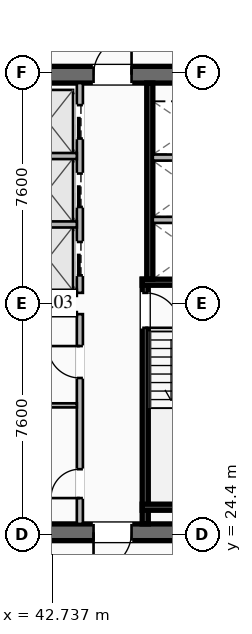
"""IFC4 building model, lengths in metres.
Left out: names, types, materials, properties, quantities, classifications, styles, units other than length and angle.
Written with IfcOpenShell. Run it as: python <this file> out.ifc"""

import sys

from ifc_helpers import new_model, si_unit, direction, frame, frame_2d, origin, place, context, subcontext, project, spatial, rectangle, extrude, element, fill, save


model = new_model("IFC4")
c1 = context("Model", 3, precision=1e-05, world=origin(), true_north=direction((0.0, 1.0)))
c2 = subcontext(c1, "Body", "Model", "MODEL_VIEW")
j1 = project(units=[si_unit("LENGTHUNIT", "METRE"), si_unit("PLANEANGLEUNIT", "RADIAN")], contexts=[c1])
p1 = place(None, origin())
s1 = spatial("IfcSite", under=j1, at=p1, CompositionType="ELEMENT")
p2 = place(p1, origin())
s2 = spatial("IfcBuilding", under=s1, at=p2, CompositionType="ELEMENT")
p3 = place(p2, frame((0.0, 0.0, 185.4)))
s3 = spatial("IfcBuildingStorey", under=s2, at=p3, CompositionType="ELEMENT", Elevation=185.4)
p4 = place(p3, frame((49.25, 24.475, 0.0), z_axis=(0.0, 0.0, 1.0), x_axis=(-1.0, 0.0, 0.0)))
e1 = element("IfcWall", 1, at=p4, inside=s3, PredefinedType="SHEAR", context=c2, shape_type="SweptSolid", body=[
    extrude(rectangle(XDim=14.5, YDim=0.55, at=frame_2d((7.25, 0.0))), origin(), (0.0, 0.0, 1.0), 3.55),
])
p5 = place(p4, frame((8.95, 0.0, 0.0)))
e2 = element("IfcOpeningElement", 2, at=p5, cuts=e1, PredefinedType="OPENING", context=c2, shape_type="SweptSolid", body=[
    extrude(rectangle(XDim=1.25, YDim=2.25, at=frame_2d((0.625, 1.125))), frame((0.0, 0.285, 0.0), z_axis=(0.0, -1.0, 0.0), x_axis=(1.0, 0.0, 0.0)), (0.0, 0.0, 1.0), 0.57),
])
p6 = place(p4, frame((3.9, 0.0, 0.0)))
e3 = element("IfcOpeningElement", 3, at=p6, cuts=e1, PredefinedType="OPENING", context=c2, shape_type="SweptSolid", body=[
    extrude(rectangle(XDim=1.25, YDim=2.25, at=frame_2d((0.625, 1.125))), frame((0.0, 0.285, 0.0), z_axis=(0.0, -1.0, 0.0), x_axis=(1.0, 0.0, 0.0)), (0.0, 0.0, 1.0), 0.57),
])
p7 = place(p3, frame((34.75, 39.525, 0.0), z_axis=(0.0, 0.0, 1.0), x_axis=(1.0, 0.0, 0.0)))
e4 = element("IfcWall", 4, at=p7, inside=s3, PredefinedType="SHEAR", context=c2, shape_type="SweptSolid", body=[
    extrude(rectangle(XDim=14.5, YDim=0.55, at=frame_2d((7.25, 0.0))), origin(), (0.0, 0.0, 1.0), 3.55),
])
p8 = place(p7, frame((4.3, 0.0, 0.0)))
e5 = element("IfcOpeningElement", 5, at=p8, cuts=e4, PredefinedType="OPENING", context=c2, shape_type="SweptSolid", body=[
    extrude(rectangle(XDim=1.25, YDim=2.25, at=frame_2d((0.625, 1.125))), frame((0.0, 0.285, 0.0), z_axis=(0.0, -1.0, 0.0), x_axis=(1.0, 0.0, 0.0)), (0.0, 0.0, 1.0), 0.57),
])
p9 = place(p7, frame((9.35, 0.0, 0.0)))
e6 = element("IfcOpeningElement", 6, at=p9, cuts=e4, PredefinedType="OPENING", context=c2, shape_type="SweptSolid", body=[
    extrude(rectangle(XDim=1.25, YDim=2.25, at=frame_2d((0.625, 1.125))), frame((0.0, 0.285, 0.0), z_axis=(0.0, -1.0, 0.0), x_axis=(1.0, 0.0, 0.0)), (0.0, 0.0, 1.0), 0.57),
])
p10 = place(p3, frame((45.8, 32.8, 0.0), z_axis=(0.0, 0.0, 1.0), x_axis=(0.0, -1.0, 0.0)))
e7 = element("IfcWall", 7, at=p10, inside=s3, PredefinedType="SHEAR", context=c2, shape_type="SweptSolid", body=[
    extrude(rectangle(XDim=8.05, YDim=0.2, at=frame_2d((4.025, 0.0))), origin(), (0.0, 0.0, 1.0), 3.37),
])
p11 = place(p10, frame((0.45, 0.0, 0.0)))
e8 = element("IfcOpeningElement", 8, at=p11, cuts=e7, PredefinedType="OPENING", context=c2, shape_type="SweptSolid", body=[
    extrude(rectangle(XDim=1.15, YDim=2.2, at=frame_2d((0.575, 1.1))), frame((0.0, 0.11, 0.0), z_axis=(0.0, -1.0, 0.0), x_axis=(1.0, 0.0, 0.0)), (0.0, 0.0, 1.0), 0.22),
])
for number, where, z_axis, x_axis in (
    (9, (45.7, 32.7, 0.0), (0.0, 0.0, 1.0), (1.0, 0.0, 0.0)),
    (10, (45.7, 25.3, 0.0), (0.0, 0.0, 1.0), (1.0, 0.0, 0.0)),
):
    element("IfcWall", number, at=place(p3, frame(where, z_axis=z_axis, x_axis=x_axis)), inside=s3, PredefinedType="SHEAR", context=c2, shape_type="SweptSolid", body=[
        extrude(rectangle(XDim=3.55, YDim=0.2, at=frame_2d((1.775, 0.0))), origin(), (0.0, 0.0, 1.0), 3.37),
    ])
p12 = place(p3, frame((45.95, 39.25, 0.0), z_axis=(0.0, 0.0, 1.0), x_axis=(0.0, -1.0, 0.0)))
e11 = element("IfcWall", 11, at=p12, inside=s3, PredefinedType="SHEAR", context=c2, shape_type="SweptSolid", body=[
    extrude(rectangle(XDim=6.45, YDim=0.2, at=frame_2d((3.225, 0.0))), origin(), (0.0, 0.0, 1.0), 3.37),
])
for number, where, z_axis, x_axis in (
    (12, (46.05, 34.75, 0.0), (0.0, 0.0, 1.0), (1.0, 0.0, 0.0)),
    (13, (46.05, 36.8, 0.0), (0.0, 0.0, 1.0), (1.0, 0.0, 0.0)),
):
    element("IfcWall", number, at=place(p3, frame(where, z_axis=z_axis, x_axis=x_axis)), inside=s3, PredefinedType="SOLIDWALL", context=c2, shape_type="SweptSolid", body=[
        extrude(rectangle(XDim=3.2, YDim=0.2, at=frame_2d((1.6, 0.0))), origin(), (0.0, 0.0, 1.0), 3.37),
    ])
p13 = place(p3, frame((43.65, 24.75, 0.0), z_axis=(0.0, 0.0, 1.0), x_axis=(0.0, 1.0, 0.0)))
e14 = element("IfcWall", 14, at=p13, inside=s3, PredefinedType="SOLIDWALL", context=c2, shape_type="SweptSolid", body=[
    extrude(rectangle(XDim=6.9, YDim=0.2, at=frame_2d((3.45, 0.0))), origin(), (0.0, 0.0, 1.0), 2.723),
])
p14 = place(p13, frame((0.85, 0.0, 0.0)))
e15 = element("IfcOpeningElement", 15, at=p14, cuts=e14, PredefinedType="OPENING", context=c2, shape_type="SweptSolid", body=[
    extrude(rectangle(XDim=0.95, YDim=2.05, at=frame_2d((0.475, 1.025))), frame((0.0, 0.11, 0.0), z_axis=(0.0, -1.0, 0.0), x_axis=(1.0, 0.0, 0.0)), (0.0, 0.0, 1.0), 0.22),
])
p15 = place(p13, frame((4.8, 0.0, 0.0)))
e16 = element("IfcOpeningElement", 16, at=p15, cuts=e14, PredefinedType="OPENING", context=c2, shape_type="SweptSolid", body=[
    extrude(rectangle(XDim=1.05, YDim=2.2, at=frame_2d((0.525, 1.1))), frame((0.0, 0.11, 0.0), z_axis=(0.0, -1.0, 0.0), x_axis=(1.0, 0.0, 0.0)), (0.0, 0.0, 1.0), 0.22),
])
for number, where, z_axis, x_axis in (
    (17, (41.67, 31.65, 0.0), (0.0, 0.0, 1.0), (1.0, 0.0, 0.0)),
    (18, (41.67, 28.65, 0.0), (0.0, 0.0, 1.0), (1.0, 0.0, 0.0)),
):
    element("IfcWall", number, at=place(p3, frame(where, z_axis=z_axis, x_axis=x_axis)), inside=s3, PredefinedType="PARTITIONING", context=c2, shape_type="SweptSolid", body=[
        extrude(rectangle(XDim=1.88, YDim=0.135, at=frame_2d((0.94, 0.0))), origin(), (0.0, 0.0, 1.0), 2.723),
    ])
p16 = place(p3, frame((43.65, 32.35, 0.0), z_axis=(0.0, 0.0, 1.0), x_axis=(0.0, 1.0, 0.0)))
e19 = element("IfcWall", 19, at=p16, inside=s3, PredefinedType="SOLIDWALL", context=c2, shape_type="SweptSolid", body=[
    extrude(rectangle(XDim=6.9, YDim=0.2, at=frame_2d((3.45, 0.0))), origin(), (0.0, 0.0, 1.0), 3.37),
])
p17 = place(p16, frame((0.575, 0.0, 0.0)))
e20 = element("IfcOpeningElement", 20, at=p17, cuts=e19, PredefinedType="OPENING", context=c2, shape_type="SweptSolid", body=[
    extrude(rectangle(XDim=1.1, YDim=2.2, at=frame_2d((0.55, 1.1))), frame((0.0, 0.11, 0.0), z_axis=(0.0, -1.0, 0.0), x_axis=(1.0, 0.0, 0.0)), (0.0, 0.0, 1.0), 0.22),
])
p18 = place(p16, frame((2.825, 0.0, 0.0)))
e21 = element("IfcOpeningElement", 21, at=p18, cuts=e19, PredefinedType="OPENING", context=c2, shape_type="SweptSolid", body=[
    extrude(rectangle(XDim=1.1, YDim=2.2, at=frame_2d((0.55, 1.1))), frame((0.0, 0.11, 0.0), z_axis=(0.0, -1.0, 0.0), x_axis=(1.0, 0.0, 0.0)), (0.0, 0.0, 1.0), 0.22),
])
p19 = place(p16, frame((5.075, 0.0, 0.0)))
e22 = element("IfcOpeningElement", 22, at=p19, cuts=e19, PredefinedType="OPENING", context=c2, shape_type="SweptSolid", body=[
    extrude(rectangle(XDim=1.1, YDim=2.2, at=frame_2d((0.55, 1.1))), frame((0.0, 0.11, 0.0), z_axis=(0.0, -1.0, 0.0), x_axis=(1.0, 0.0, 0.0)), (0.0, 0.0, 1.0), 0.22),
])
for number, where, z_axis, x_axis in (
    (23, (41.67, 32.35, 0.0), (0.0, 0.0, 1.0), (1.0, 0.0, 0.0)),
    (24, (41.67, 34.6, 0.0), (0.0, 0.0, 1.0), (1.0, 0.0, 0.0)),
    (25, (41.67, 36.85, 0.0), (0.0, 0.0, 1.0), (1.0, 0.0, 0.0)),
):
    element("IfcWall", number, at=place(p3, frame(where, z_axis=z_axis, x_axis=x_axis)), inside=s3, PredefinedType="SOLIDWALL", context=c2, shape_type="SweptSolid", body=[
        extrude(rectangle(XDim=1.88, YDim=0.2, at=frame_2d((0.94, 0.0))), origin(), (0.0, 0.0, 1.0), 3.37),
    ])
p20 = place(p9, origin())
e26 = element("IfcDoor", 26, at=p20, inside=s3, OperationType="SINGLE_SWING_RIGHT", PredefinedType="DOOR", context=c2, shape_type="SweptSolid", body=[
    extrude(rectangle(XDim=1.25, YDim=2.25, at=frame_2d((0.625, 1.125))), frame((0.0, 0.025, 0.0), z_axis=(0.0, -1.0, 0.0), x_axis=(1.0, 0.0, 0.0)), (0.0, 0.0, 1.0), 0.05),
])
fill(e6, e26)
p21 = place(p6, origin())
e27 = element("IfcDoor", 27, at=p21, inside=s3, OperationType="SINGLE_SWING_RIGHT", PredefinedType="DOOR", context=c2, shape_type="SweptSolid", body=[
    extrude(rectangle(XDim=1.25, YDim=2.25, at=frame_2d((0.625, 1.125))), frame((0.0, 0.025, 0.0), z_axis=(0.0, -1.0, 0.0), x_axis=(1.0, 0.0, 0.0)), (0.0, 0.0, 1.0), 0.05),
])
fill(e3, e27)
p22 = place(p11, origin())
e28 = element("IfcDoor", 28, at=p22, inside=s3, OperationType="SINGLE_SWING_RIGHT", PredefinedType="DOOR", context=c2, shape_type="SweptSolid", body=[
    extrude(rectangle(XDim=1.15, YDim=2.2, at=frame_2d((0.575, 1.1))), frame((0.0, 0.025, 0.0), z_axis=(0.0, -1.0, 0.0), x_axis=(1.0, 0.0, 0.0)), (0.0, 0.0, 1.0), 0.05),
])
fill(e8, e28)
p23 = place(p14, origin())
e29 = element("IfcDoor", 29, at=p23, inside=s3, OperationType="SINGLE_SWING_LEFT", PredefinedType="DOOR", context=c2, shape_type="SweptSolid", body=[
    extrude(rectangle(XDim=0.95, YDim=2.05, at=frame_2d((0.475, 1.025))), frame((0.0, 0.025, 0.0), z_axis=(0.0, -1.0, 0.0), x_axis=(1.0, 0.0, 0.0)), (0.0, 0.0, 1.0), 0.05),
])
fill(e15, e29)
p24 = place(p15, origin())
e30 = element("IfcDoor", 30, at=p24, inside=s3, OperationType="SINGLE_SWING_RIGHT", PredefinedType="DOOR", context=c2, shape_type="SweptSolid", body=[
    extrude(rectangle(XDim=1.05, YDim=2.2, at=frame_2d((0.525, 1.1))), frame((0.0, 0.025, 0.0), z_axis=(0.0, -1.0, 0.0), x_axis=(1.0, 0.0, 0.0)), (0.0, 0.0, 1.0), 0.05),
])
fill(e16, e30)
p25 = place(p17, origin())
e31 = element("IfcDoor", 31, at=p25, inside=s3, OperationType="SLIDING_TO_LEFT", PredefinedType="DOOR", context=c2, shape_type="SweptSolid", body=[
    extrude(rectangle(XDim=1.1, YDim=2.2, at=frame_2d((0.55, 1.1))), frame((0.0, 0.025, 0.0), z_axis=(0.0, -1.0, 0.0), x_axis=(1.0, 0.0, 0.0)), (0.0, 0.0, 1.0), 0.05),
])
fill(e20, e31)
p26 = place(p18, origin())
e32 = element("IfcDoor", 32, at=p26, inside=s3, OperationType="SLIDING_TO_LEFT", PredefinedType="DOOR", context=c2, shape_type="SweptSolid", body=[
    extrude(rectangle(XDim=1.1, YDim=2.2, at=frame_2d((0.55, 1.1))), frame((0.0, 0.025, 0.0), z_axis=(0.0, -1.0, 0.0), x_axis=(1.0, 0.0, 0.0)), (0.0, 0.0, 1.0), 0.05),
])
fill(e21, e32)
p27 = place(p19, origin())
e33 = element("IfcDoor", 33, at=p27, inside=s3, OperationType="SLIDING_TO_LEFT", PredefinedType="DOOR", context=c2, shape_type="SweptSolid", body=[
    extrude(rectangle(XDim=1.1, YDim=2.2, at=frame_2d((0.55, 1.1))), frame((0.0, 0.025, 0.0), z_axis=(0.0, -1.0, 0.0), x_axis=(1.0, 0.0, 0.0)), (0.0, 0.0, 1.0), 0.05),
])
fill(e22, e33)
save(model, sys.argv[1])
